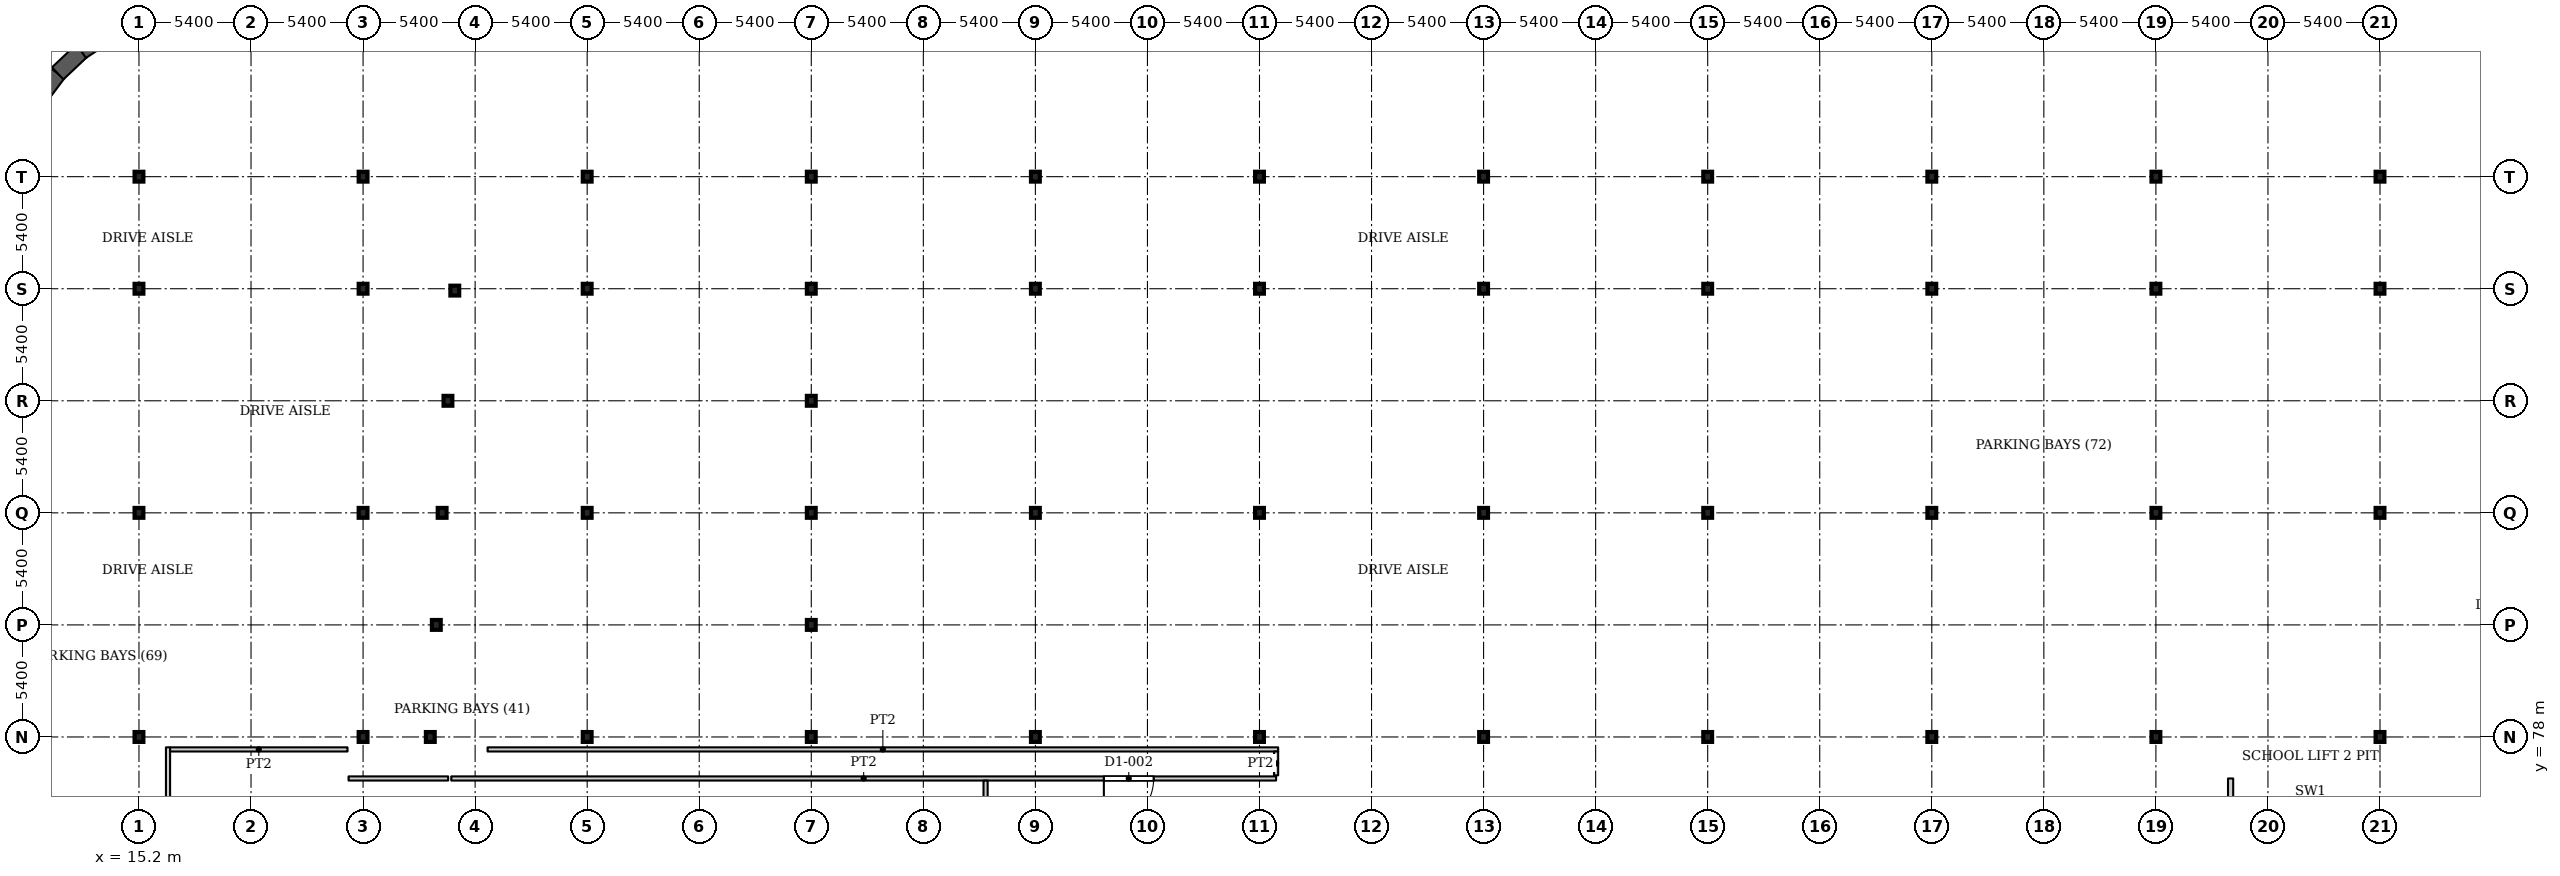
"""IFC4 building model, lengths in metres.
Left out: names, types, materials, properties, quantities, classifications, styles, units other than length and angle.
Written with IfcOpenShell. Run it as: python <this file> out.ifc"""

import sys

from ifc_helpers import new_model, si_unit, direction, frame, frame_2d, origin, origin_2d, place, context, subcontext, project, spatial, rectangle, i_section, extrude, source, transform, mapped, element, fill, save


model = new_model("IFC4")
c1 = context("Model", 3, precision=1e-05, world=origin(), true_north=direction((0.0, 1.0)))
c2 = subcontext(c1, "Body", "Model", "MODEL_VIEW")
j1 = project(units=[si_unit("LENGTHUNIT", "METRE"), si_unit("PLANEANGLEUNIT", "RADIAN")], contexts=[c1])
p1 = place(None, origin())
s1 = spatial("IfcSite", under=j1, at=p1, CompositionType="ELEMENT")
p2 = place(p1, origin())
s2 = spatial("IfcBuilding", under=s1, at=p2, CompositionType="ELEMENT")
p3 = place(p2, frame((0.0, 0.0, -5.0)))
s3 = spatial("IfcBuildingStorey", under=s2, at=p3, CompositionType="ELEMENT", Elevation=-5.0)
for number, where, z_axis, x_axis in (
    (1, (15.2, 78.0, 0.0), (0.0, 0.0, 1.0), (1.0, 0.0, 0.0)),
    (2, (26.0, 78.0, 0.0), (0.0, 0.0, 1.0), (1.0, 0.0, 0.0)),
    (3, (36.8, 78.0, 0.0), (0.0, 0.0, 1.0), (1.0, 0.0, 0.0)),
    (4, (47.6, 78.0, 0.0), (0.0, 0.0, 1.0), (1.0, 0.0, 0.0)),
    (5, (58.4, 78.0, 0.0), (0.0, 0.0, 1.0), (1.0, 0.0, 0.0)),
    (6, (69.2, 78.0, 0.0), (0.0, 0.0, 1.0), (1.0, 0.0, 0.0)),
    (7, (80.0, 78.0, 0.0), (0.0, 0.0, 1.0), (1.0, 0.0, 0.0)),
    (8, (90.8, 78.0, 0.0), (0.0, 0.0, 1.0), (1.0, 0.0, 0.0)),
    (9, (101.6, 78.0, 0.0), (0.0, 0.0, 1.0), (1.0, 0.0, 0.0)),
    (10, (112.4, 78.0, 0.0), (0.0, 0.0, 1.0), (1.0, 0.0, 0.0)),
    (11, (123.2, 78.0, 0.0), (0.0, 0.0, 1.0), (1.0, 0.0, 0.0)),
    (12, (15.2, 88.8, 0.0), (0.0, 0.0, 1.0), (1.0, 0.0, 0.0)),
    (13, (26.0, 88.8, 0.0), (0.0, 0.0, 1.0), (1.0, 0.0, 0.0)),
    (14, (36.8, 88.8, 0.0), (0.0, 0.0, 1.0), (1.0, 0.0, 0.0)),
    (15, (47.6, 88.8, 0.0), (0.0, 0.0, 1.0), (1.0, 0.0, 0.0)),
    (16, (58.4, 88.8, 0.0), (0.0, 0.0, 1.0), (1.0, 0.0, 0.0)),
    (17, (69.2, 88.8, 0.0), (0.0, 0.0, 1.0), (1.0, 0.0, 0.0)),
    (18, (80.0, 88.8, 0.0), (0.0, 0.0, 1.0), (1.0, 0.0, 0.0)),
    (19, (90.8, 88.8, 0.0), (0.0, 0.0, 1.0), (1.0, 0.0, 0.0)),
    (20, (101.6, 88.8, 0.0), (0.0, 0.0, 1.0), (1.0, 0.0, 0.0)),
    (21, (112.4, 88.8, 0.0), (0.0, 0.0, 1.0), (1.0, 0.0, 0.0)),
    (22, (123.2, 88.8, 0.0), (0.0, 0.0, 1.0), (1.0, 0.0, 0.0)),
    (23, (15.2, 99.6, 0.0), (0.0, 0.0, 1.0), (1.0, 0.0, 0.0)),
    (24, (26.0, 99.6, 0.0), (0.0, 0.0, 1.0), (1.0, 0.0, 0.0)),
    (25, (36.8, 99.6, 0.0), (0.0, 0.0, 1.0), (1.0, 0.0, 0.0)),
    (26, (47.6, 99.6, 0.0), (0.0, 0.0, 1.0), (1.0, 0.0, 0.0)),
    (27, (58.4, 99.6, 0.0), (0.0, 0.0, 1.0), (1.0, 0.0, 0.0)),
    (28, (69.2, 99.6, 0.0), (0.0, 0.0, 1.0), (1.0, 0.0, 0.0)),
    (29, (80.0, 99.6, 0.0), (0.0, 0.0, 1.0), (1.0, 0.0, 0.0)),
    (30, (90.8, 99.6, 0.0), (0.0, 0.0, 1.0), (1.0, 0.0, 0.0)),
    (31, (101.6, 99.6, 0.0), (0.0, 0.0, 1.0), (1.0, 0.0, 0.0)),
    (32, (112.4, 99.6, 0.0), (0.0, 0.0, 1.0), (1.0, 0.0, 0.0)),
    (33, (123.2, 99.6, 0.0), (0.0, 0.0, 1.0), (1.0, 0.0, 0.0)),
    (34, (15.2, 105.0, 0.0), (0.0, 0.0, 1.0), (1.0, 0.0, 0.0)),
    (35, (26.0, 105.0, 0.0), (0.0, 0.0, 1.0), (1.0, 0.0, 0.0)),
    (36, (36.8, 105.0, 0.0), (0.0, 0.0, 1.0), (1.0, 0.0, 0.0)),
    (37, (47.6, 105.0, 0.0), (0.0, 0.0, 1.0), (1.0, 0.0, 0.0)),
    (38, (58.4, 105.0, 0.0), (0.0, 0.0, 1.0), (1.0, 0.0, 0.0)),
    (39, (69.2, 105.0, 0.0), (0.0, 0.0, 1.0), (1.0, 0.0, 0.0)),
    (40, (80.0, 105.0, 0.0), (0.0, 0.0, 1.0), (1.0, 0.0, 0.0)),
    (41, (90.8, 105.0, 0.0), (0.0, 0.0, 1.0), (1.0, 0.0, 0.0)),
    (42, (101.6, 105.0, 0.0), (0.0, 0.0, 1.0), (1.0, 0.0, 0.0)),
    (43, (112.4, 105.0, 0.0), (0.0, 0.0, 1.0), (1.0, 0.0, 0.0)),
    (44, (123.2, 105.0, 0.0), (0.0, 0.0, 1.0), (1.0, 0.0, 0.0)),
    (45, (29.24, 78.0, 0.0), (0.0, 0.0, 1.0), (1.0, 0.0, 0.0)),
    (46, (29.53, 83.4, 0.0), (0.0, 0.0, 1.0), (1.0, 0.0, 0.0)),
    (47, (47.6, 83.4, 0.0), (0.0, 0.0, 1.0), (1.0, 0.0, 0.0)),
    (48, (29.81, 88.8, 0.0), (0.0, 0.0, 1.0), (1.0, 0.0, 0.0)),
    (49, (30.09, 94.2, 0.0), (0.0, 0.0, 1.0), (1.0, 0.0, 0.0)),
    (50, (47.6, 94.2, 0.0), (0.0, 0.0, 1.0), (1.0, 0.0, 0.0)),
    (51, (30.42, 99.51, 0.0), (0.0, 0.0, 1.0), (1.0, 0.0, 0.0)),
):
    element("IfcColumn", number, at=place(p3, frame(where, z_axis=z_axis, x_axis=x_axis)), inside=s3, PredefinedType="COLUMN", context=c2, shape_type="SweptSolid", body=[
        extrude(i_section(OverallWidth=0.424, OverallDepth=0.474, WebThickness=0.048, FlangeThickness=0.077, FilletRadius=0.014, at=origin_2d()), origin(), (0.0, 0.0, 1.0), 5.0),
    ])
p4 = place(p3, frame((10.346, 108.721, 0.0), z_axis=(0.0, 0.0, 1.0), x_axis=(0.597630520512, 0.801771638905, 0.0)))
e52 = element("IfcWall", 52, at=p4, inside=s3, PredefinedType="SOLIDWALL", context=c2, shape_type="SweptSolid", body=[
    extrude(rectangle(XDim=1.568, YDim=0.8, at=frame_2d((0.784, 0.0))), origin(), (0.0, 0.0, 1.0), 5.0),
])
p5 = place(p3, frame((11.283, 109.978, 0.0), z_axis=(0.0, 0.0, 1.0), x_axis=(0.726995868662, 0.686641833089, 0.0)))
e53 = element("IfcWall", 53, at=p5, inside=s3, PredefinedType="SOLIDWALL", context=c2, shape_type="SweptSolid", body=[
    extrude(rectangle(XDim=1.567, YDim=0.8, at=frame_2d((0.783, 0.0))), origin(), (0.0, 0.0, 1.0), 5.0),
])
p6 = place(p3, frame((12.422, 111.054, 0.0), z_axis=(0.0, 0.0, 1.0), x_axis=(0.835603348101, 0.549333272834, 0.0)))
e54 = element("IfcWall", 54, at=p6, inside=s3, PredefinedType="SOLIDWALL", context=c2, shape_type="SweptSolid", body=[
    extrude(rectangle(XDim=1.568, YDim=0.8, at=frame_2d((0.784, 0.0))), origin(), (0.0, 0.0, 1.0), 5.0),
])
p7 = place(p3, frame((16.6, 67.7, 0.0), z_axis=(0.0, 0.0, 1.0), x_axis=(0.0, 1.0, 0.0)))
e55 = element("IfcWall", 55, at=p7, inside=s3, PredefinedType="PARTITIONING", context=c2, shape_type="SweptSolid", body=[
    extrude(rectangle(XDim=9.8, YDim=0.2, at=frame_2d((4.9, 0.0))), origin(), (0.0, 0.0, 1.0), 4.58),
])
p8 = place(p3, frame((16.7, 77.4, 0.0), z_axis=(0.0, 0.0, 1.0), x_axis=(1.0, 0.0, 0.0)))
e56 = element("IfcWall", 56, at=p8, inside=s3, PredefinedType="PARTITIONING", context=c2, shape_type="SweptSolid", body=[
    extrude(rectangle(XDim=8.55, YDim=0.2, at=frame_2d((4.275, 0.0))), origin(), (0.0, 0.0, 1.0), 4.58),
])
p9 = place(p3, frame((25.3, 76.0, 0.0), z_axis=(0.0, 0.0, 1.0), x_axis=(1.0, 0.0, 0.0)))
e57 = element("IfcWall", 57, at=p9, inside=s3, PredefinedType="PARTITIONING", context=c2, shape_type="SweptSolid", body=[
    extrude(rectangle(XDim=4.8, YDim=0.2, at=frame_2d((2.4, 0.0))), origin(), (0.0, 0.0, 1.0), 4.58),
])
p10 = place(p3, frame((30.25, 76.0, 0.0), z_axis=(0.0, 0.0, 1.0), x_axis=(1.0, 0.0, 0.0)))
e58 = element("IfcWall", 58, at=p10, inside=s3, PredefinedType="PARTITIONING", context=c2, shape_type="SweptSolid", body=[
    extrude(rectangle(XDim=39.75, YDim=0.2, at=frame_2d((19.875, 0.0))), origin(), (0.0, 0.0, 1.0), 4.58),
])
p11 = place(p10, frame((31.45, 0.0, 0.0)))
e59 = element("IfcOpeningElement", 59, at=p11, cuts=e58, PredefinedType="OPENING", context=c2, shape_type="SweptSolid", body=[
    extrude(rectangle(XDim=2.4, YDim=2.1, at=frame_2d((1.2, 1.05))), frame((0.0, 0.11, 0.0), z_axis=(0.0, -1.0, 0.0), x_axis=(1.0, 0.0, 0.0)), (0.0, 0.0, 1.0), 0.22),
])
p12 = place(p3, frame((32.0, 77.4, 0.0), z_axis=(0.0, 0.0, 1.0), x_axis=(1.0, 0.0, 0.0)))
e60 = element("IfcWall", 60, at=p12, inside=s3, PredefinedType="PARTITIONING", context=c2, shape_type="SweptSolid", body=[
    extrude(rectangle(XDim=38.1, YDim=0.2, at=frame_2d((19.05, 0.0))), origin(), (0.0, 0.0, 1.0), 4.58),
])
p13 = place(p3, frame((56.0, 69.4, 0.0), z_axis=(0.0, 0.0, 1.0), x_axis=(0.0, 1.0, 0.0)))
e61 = element("IfcWall", 61, at=p13, inside=s3, PredefinedType="PARTITIONING", context=c2, shape_type="SweptSolid", body=[
    extrude(rectangle(XDim=6.5, YDim=0.2, at=frame_2d((3.25, 0.0))), origin(), (0.0, 0.0, 1.0), 4.58),
])
p14 = place(p3, frame((70.0, 76.15, 0.0), z_axis=(0.0, 0.0, 1.0), x_axis=(0.0, 1.0, 0.0)))
e62 = element("IfcWall", 62, at=p14, inside=s3, PredefinedType="PARTITIONING", context=c2, shape_type="SweptSolid", body=[
    extrude(rectangle(XDim=1.15, YDim=0.2, at=frame_2d((0.575, 0.0))), origin(), (0.0, 0.0, 1.0), 4.58),
])
p15 = place(p3, frame((116.0, 40.0, 0.0), z_axis=(0.0, 0.0, 1.0), x_axis=(0.0, 1.0, 0.0)))
e63 = element("IfcWall", 63, at=p15, inside=s3, PredefinedType="PARTITIONING", context=c2, shape_type="SweptSolid", body=[
    extrude(rectangle(XDim=36.0, YDim=0.25, at=frame_2d((18.0, 0.0))), origin(), (0.0, 0.0, 1.0), 4.58),
])
p16 = place(p15, frame((9.4, 0.0, 0.0)))
e64 = element("IfcOpeningElement", 64, at=p16, cuts=e63, PredefinedType="OPENING", context=c2, shape_type="SweptSolid", body=[
    extrude(rectangle(XDim=1.2, YDim=2.1, at=frame_2d((0.6, 1.05))), frame((0.0, 0.135, 0.0), z_axis=(0.0, -1.0, 0.0), x_axis=(1.0, 0.0, 0.0)), (0.0, 0.0, 1.0), 0.27),
])
p17 = place(p15, frame((25.4, 0.0, 0.0)))
e65 = element("IfcOpeningElement", 65, at=p17, cuts=e63, PredefinedType="OPENING", context=c2, shape_type="SweptSolid", body=[
    extrude(rectangle(XDim=1.2, YDim=2.1, at=frame_2d((0.6, 1.05))), frame((0.0, 0.135, 0.0), z_axis=(0.0, -1.0, 0.0), x_axis=(1.0, 0.0, 0.0)), (0.0, 0.0, 1.0), 0.27),
])
m1 = source(origin(), c2, "Body", "SweptSolid", [
    extrude(rectangle(XDim=2.4, YDim=2.1, at=frame_2d((1.2, 1.05))), frame((0.0, 0.025, 0.0), z_axis=(0.0, -1.0, 0.0), x_axis=(1.0, 0.0, 0.0)), (0.0, 0.0, 1.0), 0.05),
])
p18 = place(p11, origin())
e66 = element("IfcDoor", 66, at=p18, inside=s3, OperationType="DOUBLE_DOOR_SINGLE_SWING", PredefinedType="DOOR", context=c2, shape_type="MappedRepresentation", body=[
    mapped(m1, transform((0.0, 0.0, 0.0), x_axis=(1.0, 0.0, 0.0), y_axis=(0.0, 1.0, 0.0), z_axis=(0.0, 0.0, 1.0), scale=1.0)),
])
fill(e59, e66)
save(model, sys.argv[1])
